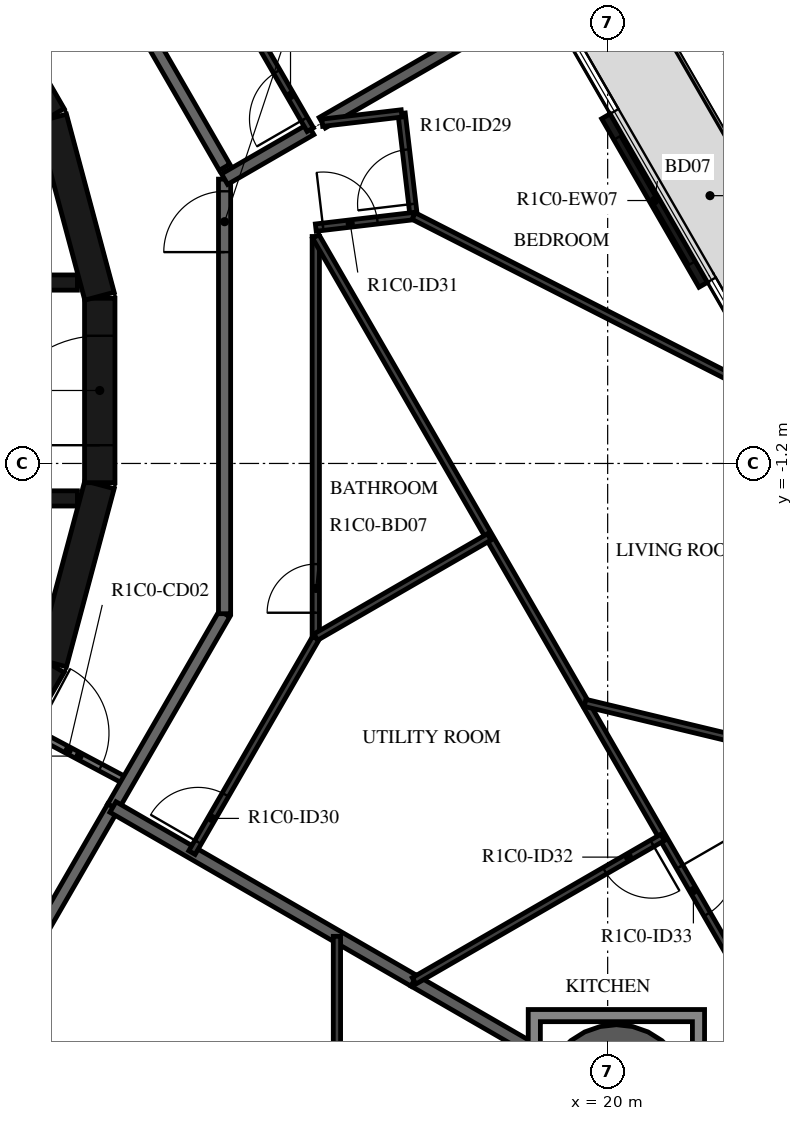
"""IFC4 building model, lengths in metres.
Left out: names, types, materials, properties, quantities, classifications, styles, units other than length and angle.
Written with IfcOpenShell. Run it as: python <this file> out.ifc"""

import sys

from ifc_helpers import new_model, si_unit, direction, frame, frame_2d, origin, origin_2d, place, context, subcontext, project, spatial, polyline, rectangle, hollow_circle, outline, extrude, element, fill, save


model = new_model("IFC4")
c1 = context("Model", 3, precision=1e-05, world=origin(), true_north=direction((0.0, 1.0)))
c2 = subcontext(c1, "Body", "Model", "MODEL_VIEW")
j1 = project(units=[si_unit("LENGTHUNIT", "METRE"), si_unit("PLANEANGLEUNIT", "RADIAN")], contexts=[c1])
p1 = place(None, origin())
s1 = spatial("IfcSite", under=j1, at=p1, CompositionType="ELEMENT")
p2 = place(p1, origin())
s2 = spatial("IfcBuilding", under=s1, at=p2, CompositionType="ELEMENT")
p3 = place(p2, frame((0.0, 0.0, 66.4)))
s3 = spatial("IfcBuildingStorey", under=s2, at=p3, CompositionType="ELEMENT", Elevation=66.4)
p4 = place(p3, frame((20.144, -11.63, -0.38), z_axis=(0.0, 0.0, 1.0), x_axis=(1.0, 0.0, 0.0)))
e1 = element("IfcColumn", 1, at=p4, inside=s3, PredefinedType="COLUMN", context=c2, shape_type="SweptSolid", body=[
    extrude(hollow_circle(Radius=1.2, WallThickness=0.06, at=origin_2d()), origin(), (0.0, 0.0, 1.0), 2.616),
])
p5 = place(p3, frame((21.571, 1.738, 0.0), z_axis=(0.0, 0.0, 1.0), x_axis=(-0.500028443584, 0.866008981251, 0.0)))
e2 = element("IfcWall", 2, at=p5, inside=s3, PredefinedType="STANDARD", context=c2, shape_type="SweptSolid", body=[
    extrude(rectangle(XDim=3.2, YDim=0.16, at=frame_2d((1.6, 0.0))), origin(), (0.0, 0.0, 1.0), 3.05),
])
p6 = place(p5, frame((0.4, 0.0, 0.0)))
e3 = element("IfcOpeningElement", 3, at=p6, cuts=e2, PredefinedType="OPENING", context=c2, shape_type="SweptSolid", body=[
    extrude(rectangle(XDim=2.4, YDim=2.4, at=frame_2d((1.2, 1.2))), frame((0.0, 0.09, 0.0), z_axis=(0.0, -1.0, 0.0), x_axis=(1.0, 0.0, 0.0)), (0.0, 0.0, 1.0), 0.18),
])
for number, where, z_axis, x_axis in (
    (4, (9.329, -7.137, 0.0), (0.0, 0.0, 1.0), (0.5, 0.866, 0.0)),
    (5, (10.858, -4.479, 0.0), (0.0, 0.0, 1.0), (0.259, 0.966, 0.0)),
):
    element("IfcWall", number, at=place(p3, frame(where, z_axis=z_axis, x_axis=x_axis)), inside=s3, PredefinedType="SHEAR", context=c2, shape_type="SweptSolid", body=[
        extrude(rectangle(XDim=3.033, YDim=0.5, at=frame_2d((1.516, 0.0))), origin(), (0.0, 0.0, 1.0), 3.05),
    ])
p7 = place(p3, frame((11.647, -1.516, 0.0), z_axis=(0.0, 0.0, 1.0), x_axis=(0.0, 1.0, 0.0)))
e6 = element("IfcWall", 6, at=p7, inside=s3, PredefinedType="SHEAR", context=c2, shape_type="SweptSolid", body=[
    extrude(rectangle(XDim=3.033, YDim=0.5, at=frame_2d((1.516, 0.0))), origin(), (0.0, 0.0, 1.0), 3.05),
])
p8 = place(p7, frame((0.616, 0.0, 0.0)))
e7 = element("IfcOpeningElement", 7, at=p8, cuts=e6, PredefinedType="OPENING", context=c2, shape_type="SweptSolid", body=[
    extrude(rectangle(XDim=1.8, YDim=2.1, at=frame_2d((0.9, 1.05))), frame((0.0, 0.26, 0.0), z_axis=(0.0, -1.0, 0.0), x_axis=(1.0, 0.0, 0.0)), (0.0, 0.0, 1.0), 0.52),
])
for number, where, z_axis, x_axis in (
    (8, (11.643, 1.55, 0.0), (0.0, 0.0, 1.0), (-0.259, 0.966, 0.0)),
    (9, (10.845, 4.51, 0.0), (0.0, 0.0, 1.0), (-0.5, 0.866, 0.0)),
):
    element("IfcWall", number, at=place(p3, frame(where, z_axis=z_axis, x_axis=x_axis)), inside=s3, PredefinedType="SHEAR", context=c2, shape_type="SweptSolid", body=[
        extrude(rectangle(XDim=3.033, YDim=0.5, at=frame_2d((1.516, 0.0))), origin(), (0.0, 0.0, 1.0), 3.05),
    ])
p9 = place(p3, frame((3.35, 1.775, 0.0), z_axis=(0.0, 0.0, 1.0), x_axis=(1.0, 0.0, 0.0)))
e10 = element("IfcWall", 10, at=p9, inside=s3, PredefinedType="SHEAR", context=c2, shape_type="SweptSolid", body=[
    extrude(rectangle(XDim=7.93, YDim=0.25, at=frame_2d((3.965, 0.0))), origin(), (0.0, 0.0, 1.0), 3.05),
])
p10 = place(p9, frame((0.35, 0.0, 0.0)))
e11 = element("IfcOpeningElement", 11, at=p10, cuts=e10, PredefinedType="OPENING", context=c2, shape_type="SweptSolid", body=[
    extrude(rectangle(XDim=1.2, YDim=2.4, at=frame_2d((0.6, 1.2))), frame((0.0, 0.135, 0.0), z_axis=(0.0, -1.0, 0.0), x_axis=(1.0, 0.0, 0.0)), (0.0, 0.0, 1.0), 0.27),
])
p11 = place(p9, frame((2.5, 0.0, 0.0)))
e12 = element("IfcOpeningElement", 12, at=p11, cuts=e10, PredefinedType="OPENING", context=c2, shape_type="SweptSolid", body=[
    extrude(rectangle(XDim=1.2, YDim=2.4, at=frame_2d((0.6, 1.2))), frame((0.0, 0.135, 0.0), z_axis=(0.0, -1.0, 0.0), x_axis=(1.0, 0.0, 0.0)), (0.0, 0.0, 1.0), 0.27),
])
p12 = place(p9, frame((4.8, 0.0, 0.0)))
e13 = element("IfcOpeningElement", 13, at=p12, cuts=e10, PredefinedType="OPENING", context=c2, shape_type="SweptSolid", body=[
    extrude(rectangle(XDim=0.9, YDim=2.1, at=frame_2d((0.45, 1.05))), frame((0.0, 0.135, 0.0), z_axis=(0.0, -1.0, 0.0), x_axis=(1.0, 0.0, 0.0)), (0.0, 0.0, 1.0), 0.27),
])
p13 = place(p3, frame((3.35, -1.775, 0.0), z_axis=(0.0, 0.0, 1.0), x_axis=(1.0, 0.0, 0.0)))
e14 = element("IfcWall", 14, at=p13, inside=s3, PredefinedType="SHEAR", context=c2, shape_type="SweptSolid", body=[
    extrude(rectangle(XDim=7.93, YDim=0.25, at=frame_2d((3.965, 0.0))), origin(), (0.0, 0.0, 1.0), 3.05),
])
p14 = place(p13, frame((0.4, 0.0, 0.0)))
e15 = element("IfcOpeningElement", 15, at=p14, cuts=e14, PredefinedType="OPENING", context=c2, shape_type="SweptSolid", body=[
    extrude(rectangle(XDim=1.1, YDim=2.4, at=frame_2d((0.55, 1.2))), frame((0.0, 0.135, 0.0), z_axis=(0.0, -1.0, 0.0), x_axis=(1.0, 0.0, 0.0)), (0.0, 0.0, 1.0), 0.27),
])
p15 = place(p13, frame((2.55, 0.0, 0.0)))
e16 = element("IfcOpeningElement", 16, at=p15, cuts=e14, PredefinedType="OPENING", context=c2, shape_type="SweptSolid", body=[
    extrude(rectangle(XDim=1.1, YDim=2.4, at=frame_2d((0.55, 1.2))), frame((0.0, 0.135, 0.0), z_axis=(0.0, -1.0, 0.0), x_axis=(1.0, 0.0, 0.0)), (0.0, 0.0, 1.0), 0.27),
])
p16 = place(p13, frame((4.7, 0.0, 0.0)))
e17 = element("IfcOpeningElement", 17, at=p16, cuts=e14, PredefinedType="OPENING", context=c2, shape_type="SweptSolid", body=[
    extrude(rectangle(XDim=1.1, YDim=2.4, at=frame_2d((0.55, 1.2))), frame((0.0, 0.135, 0.0), z_axis=(0.0, -1.0, 0.0), x_axis=(1.0, 0.0, 0.0)), (0.0, 0.0, 1.0), 0.27),
])
p17 = place(p3, frame((10.511, -5.589, 0.0), z_axis=(0.0, 0.0, 1.0), x_axis=(0.88294043061, -0.469485032769, 0.0)))
e18 = element("IfcWall", 18, at=p17, inside=s3, PredefinedType="PARTITIONING", context=c2, shape_type="SweptSolid", body=[
    extrude(rectangle(XDim=1.804, YDim=0.12, at=frame_2d((0.902, 0.0))), origin(), (0.0, 0.0, 1.0), 3.05),
])
p18 = place(p17, frame((0.1, 0.0, 0.0)))
e19 = element("IfcOpeningElement", 19, at=p18, cuts=e18, PredefinedType="OPENING", context=c2, shape_type="SweptSolid", body=[
    extrude(rectangle(XDim=1.2, YDim=2.1, at=frame_2d((0.6, 1.05))), frame((0.0, 0.07, 0.0), z_axis=(0.0, -1.0, 0.0), x_axis=(1.0, 0.0, 0.0)), (0.0, 0.0, 1.0), 0.14),
])
p19 = place(p3, frame((13.7, 3.671, 0.0), z_axis=(0.0, 0.0, 1.0), x_axis=(-0.500001669485, 0.866024439905, 0.0)))
e20 = element("IfcWall", 20, at=p19, inside=s3, PredefinedType="STANDARD", context=c2, shape_type="SweptSolid", body=[
    extrude(rectangle(XDim=7.342, YDim=0.2, at=frame_2d((3.671, 0.0))), origin(), (0.0, 0.0, 1.0), 3.05),
])
p20 = place(p19, frame((6.142, 0.0, 0.0)))
e21 = element("IfcOpeningElement", 21, at=p20, cuts=e20, PredefinedType="OPENING", context=c2, shape_type="SweptSolid", body=[
    extrude(rectangle(XDim=1.0, YDim=2.1, at=frame_2d((0.5, 1.05))), frame((0.0, 0.11, 0.0), z_axis=(0.0, -1.0, 0.0), x_axis=(1.0, 0.0, 0.0)), (0.0, 0.0, 1.0), 0.22),
])
p21 = place(p3, frame((11.865, -6.85, 0.0), z_axis=(0.0, 0.0, 1.0), x_axis=(0.499987270552, 0.86603275301, 0.0)))
e22 = element("IfcWall", 22, at=p21, inside=s3, PredefinedType="STANDARD", context=c2, shape_type="SweptSolid", body=[
    extrude(rectangle(XDim=3.671, YDim=0.2, at=frame_2d((1.835, 0.0))), origin(), (0.0, 0.0, 1.0), 3.05),
])
p22 = place(p3, frame((13.7, -3.671, 0.0), z_axis=(0.0, 0.0, 1.0), x_axis=(0.0, 1.0, 0.0)))
e23 = element("IfcWall", 23, at=p22, inside=s3, PredefinedType="STANDARD", context=c2, shape_type="SweptSolid", body=[
    extrude(rectangle(XDim=7.146, YDim=0.2, at=frame_2d((3.573, 0.0))), origin(), (0.0, 0.0, 1.0), 3.05),
])
p23 = place(p22, frame((5.947, 0.0, 0.0)))
e24 = element("IfcOpeningElement", 24, at=p23, cuts=e23, PredefinedType="OPENING", context=c2, shape_type="SweptSolid", body=[
    extrude(rectangle(XDim=1.0, YDim=2.1, at=frame_2d((0.5, 1.05))), frame((0.0, 0.11, 0.0), z_axis=(0.0, -1.0, 0.0), x_axis=(1.0, 0.0, 0.0)), (0.0, 0.0, 1.0), 0.22),
])
p24 = place(p3, frame((10.029, -10.029, 0.0), z_axis=(0.0, 0.0, 1.0), x_axis=(0.50001606911, 0.866016126081, 0.0)))
e25 = element("IfcWall", 25, at=p24, inside=s3, PredefinedType="STANDARD", context=c2, shape_type="SweptSolid", body=[
    extrude(rectangle(XDim=3.671, YDim=0.2, at=frame_2d((1.835, 0.0))), origin(), (0.0, 0.0, 1.0), 3.05),
])
p25 = place(p3, frame((13.7, 3.476, 0.0), z_axis=(0.0, 0.0, 1.0), x_axis=(0.866014281772, 0.500019263395, 0.0)))
e26 = element("IfcWall", 26, at=p25, inside=s3, PredefinedType="STANDARD", context=c2, shape_type="SweptSolid", body=[
    extrude(rectangle(XDim=1.638, YDim=0.2, at=frame_2d((0.819, 0.0))), origin(), (0.0, 0.0, 1.0), 3.05),
])
p26 = place(p3, frame((15.306, 4.403, 0.0), z_axis=(0.0, 0.0, 1.0), x_axis=(0.866013143551, 0.500021234745, 0.0)))
e27 = element("IfcWall", 27, at=p26, inside=s3, PredefinedType="STANDARD", context=c2, shape_type="SweptSolid", body=[
    extrude(rectangle(XDim=4.173, YDim=0.2, at=frame_2d((2.086, 0.0))), origin(), (0.0, 0.0, 1.0), 3.05),
])
p27 = place(p3, frame((16.817, -9.709, 0.0), z_axis=(0.0, 0.0, 1.0), x_axis=(-0.86604338933, 0.499968846828, 0.0)))
e28 = element("IfcWall", 28, at=p27, inside=s3, PredefinedType="STANDARD", context=c2, shape_type="SweptSolid", body=[
    extrude(rectangle(XDim=5.718, YDim=0.2, at=frame_2d((2.859, 0.0))), origin(), (0.0, 0.0, 1.0), 3.05),
])
p28 = place(p3, frame((18.694, -10.793, 0.0), z_axis=(0.0, 0.0, 1.0), x_axis=(-0.866009251978, 0.500027974705, 0.0)))
e29 = element("IfcWall", 29, at=p28, inside=s3, PredefinedType="STANDARD", context=c2, shape_type="SweptSolid", body=[
    extrude(rectangle(XDim=2.167, YDim=0.2, at=frame_2d((1.084, 0.0))), origin(), (0.0, 0.0, 1.0), 3.05),
])
p29 = place(p3, frame((15.11, 4.289, 0.0), z_axis=(0.0, 0.0, 1.0), x_axis=(-0.500033654285, 0.866005972602, 0.0)))
e30 = element("IfcWall", 30, at=p29, inside=s3, PredefinedType="PARTITIONING", context=c2, shape_type="SweptSolid", body=[
    extrude(rectangle(XDim=5.003, YDim=0.12, at=frame_2d((2.501, 0.0))), origin(), (0.0, 0.0, 1.0), 3.05),
])
p30 = place(p29, frame((0.2, 0.0, 0.0)))
e31 = element("IfcOpeningElement", 31, at=p30, cuts=e30, PredefinedType="OPENING", context=c2, shape_type="SweptSolid", body=[
    extrude(rectangle(XDim=0.9, YDim=2.1, at=frame_2d((0.45, 1.05))), frame((0.0, 0.07, 0.0), z_axis=(0.0, -1.0, 0.0), x_axis=(1.0, 0.0, 0.0)), (0.0, 0.0, 1.0), 0.14),
])
p31 = place(p3, frame((15.548, -15.23, 0.0), z_axis=(0.0, 0.0, 1.0), x_axis=(0.0, 1.0, 0.0)))
e32 = element("IfcWall", 32, at=p31, inside=s3, PredefinedType="PARTITIONING", context=c2, shape_type="SweptSolid", body=[
    extrude(rectangle(XDim=6.253, YDim=0.12, at=frame_2d((3.127, 0.0))), origin(), (0.0, 0.0, 1.0), 3.05),
])
p32 = place(p31, frame((0.2, 0.0, 0.0)))
e33 = element("IfcOpeningElement", 33, at=p32, cuts=e32, PredefinedType="OPENING", context=c2, shape_type="SweptSolid", body=[
    extrude(rectangle(XDim=0.9, YDim=2.1, at=frame_2d((0.45, 1.05))), frame((0.0, 0.07, 0.0), z_axis=(0.0, -1.0, 0.0), x_axis=(1.0, 0.0, 0.0)), (0.0, 0.0, 1.0), 0.14),
])
p33 = place(p3, frame((16.81, 2.868, 0.0), z_axis=(0.0, 0.0, 1.0), x_axis=(-0.117049566217, 0.993126074096, 0.0)))
e34 = element("IfcWall", 34, at=p33, inside=s3, PredefinedType="PARTITIONING", context=c2, shape_type="SweptSolid", body=[
    extrude(rectangle(XDim=1.7, YDim=0.12, at=frame_2d((0.85, 0.0))), origin(), (0.0, 0.0, 1.0), 3.05),
])
p34 = place(p33, frame((0.2, 0.0, 0.0)))
e35 = element("IfcOpeningElement", 35, at=p34, cuts=e34, PredefinedType="OPENING", context=c2, shape_type="SweptSolid", body=[
    extrude(rectangle(XDim=0.9, YDim=2.1, at=frame_2d((0.45, 1.05))), frame((0.0, 0.07, 0.0), z_axis=(0.0, -1.0, 0.0), x_axis=(1.0, 0.0, 0.0)), (0.0, 0.0, 1.0), 0.14),
])
p35 = place(p3, frame((16.611, 4.556, 0.0), z_axis=(0.0, 0.0, 1.0), x_axis=(-0.993151872114, -0.116830470836, 0.0)))
e36 = element("IfcWall", 36, at=p35, inside=s3, PredefinedType="PARTITIONING", context=c2, shape_type="SweptSolid", body=[
    extrude(rectangle(XDim=1.314, YDim=0.12, at=frame_2d((0.657, 0.0))), origin(), (0.0, 0.0, 1.0), 3.05),
])
p36 = place(p3, frame((13.164, -7.6, 0.0), z_axis=(0.0, 0.0, 1.0), x_axis=(0.499974973053, 0.866039852617, 0.0)))
e37 = element("IfcWall", 37, at=p36, inside=s3, PredefinedType="PARTITIONING", context=c2, shape_type="SweptSolid", body=[
    extrude(rectangle(XDim=4.073, YDim=0.12, at=frame_2d((2.037, 0.0))), origin(), (0.0, 0.0, 1.0), 3.05),
])
p37 = place(p36, frame((0.2, 0.0, 0.0)))
e38 = element("IfcOpeningElement", 38, at=p37, cuts=e37, PredefinedType="OPENING", context=c2, shape_type="SweptSolid", body=[
    extrude(rectangle(XDim=0.9, YDim=2.1, at=frame_2d((0.45, 1.05))), frame((0.0, 0.07, 0.0), z_axis=(0.0, -1.0, 0.0), x_axis=(1.0, 0.0, 0.0)), (0.0, 0.0, 1.0), 0.14),
])
p38 = place(p3, frame((15.2, 2.679, 0.0), z_axis=(0.0, 0.0, 1.0), x_axis=(0.993150604323, 0.116841247567, 0.0)))
e39 = element("IfcWall", 39, at=p38, inside=s3, PredefinedType="PARTITIONING", context=c2, shape_type="SweptSolid", body=[
    extrude(rectangle(XDim=1.621, YDim=0.12, at=frame_2d((0.811, 0.0))), origin(), (0.0, 0.0, 1.0), 3.05),
])
p39 = place(p38, frame((0.12, 0.0, 0.0)))
e40 = element("IfcOpeningElement", 40, at=p39, cuts=e39, PredefinedType="OPENING", context=c2, shape_type="SweptSolid", body=[
    extrude(rectangle(XDim=0.9, YDim=2.1, at=frame_2d((0.45, 1.05))), frame((0.0, 0.07, 0.0), z_axis=(0.0, -1.0, 0.0), x_axis=(1.0, 0.0, 0.0)), (0.0, 0.0, 1.0), 0.14),
])
p40 = place(p3, frame((15.2, -4.055, 0.0), z_axis=(0.0, 0.0, 1.0), x_axis=(0.0, 1.0, 0.0)))
e41 = element("IfcWall", 41, at=p40, inside=s3, PredefinedType="PARTITIONING", context=c2, shape_type="SweptSolid", body=[
    extrude(rectangle(XDim=6.588, YDim=0.12, at=frame_2d((3.294, 0.0))), origin(), (0.0, 0.0, 1.0), 3.05),
])
p41 = place(p40, frame((0.4, 0.0, 0.0)))
e42 = element("IfcOpeningElement", 42, at=p41, cuts=e41, PredefinedType="OPENING", context=c2, shape_type="SweptSolid", body=[
    extrude(rectangle(XDim=0.8, YDim=2.1, at=frame_2d((0.4, 1.05))), frame((0.0, 0.07, 0.0), z_axis=(0.0, -1.0, 0.0), x_axis=(1.0, 0.0, 0.0)), (0.0, 0.0, 1.0), 0.14),
])
p42 = place(p3, frame((16.81, 2.868, 0.0), z_axis=(0.0, 0.0, 1.0), x_axis=(0.891097252128, -0.453812392128, 0.0)))
e43 = element("IfcWall", 43, at=p42, inside=s3, PredefinedType="PARTITIONING", context=c2, shape_type="SweptSolid", body=[
    extrude(rectangle(XDim=6.677, YDim=0.12, at=frame_2d((3.338, 0.0))), origin(), (0.0, 0.0, 1.0), 3.05),
])
p43 = place(p3, frame((15.2, 2.533, 0.0), z_axis=(0.0, 0.0, 1.0), x_axis=(0.500001127339, -0.866024752914, 0.0)))
e44 = element("IfcWall", 44, at=p43, inside=s3, PredefinedType="PARTITIONING", context=c2, shape_type="SweptSolid", body=[
    extrude(rectangle(XDim=14.434, YDim=0.12, at=frame_2d((7.217, 0.0))), origin(), (0.0, 0.0, 1.0), 3.05),
])
p44 = place(p43, frame((11.97, 0.0, 0.0)))
e45 = element("IfcOpeningElement", 45, at=p44, cuts=e44, PredefinedType="OPENING", context=c2, shape_type="SweptSolid", body=[
    extrude(rectangle(XDim=0.9, YDim=2.1, at=frame_2d((0.45, 1.05))), frame((0.0, 0.07, 0.0), z_axis=(0.0, -1.0, 0.0), x_axis=(1.0, 0.0, 0.0)), (0.0, 0.0, 1.0), 0.14),
])
p45 = place(p3, frame((20.905, -7.349, 0.0), z_axis=(0.0, 0.0, 1.0), x_axis=(-0.866032292145, -0.49998806882, 0.0)))
e46 = element("IfcWall", 46, at=p45, inside=s3, PredefinedType="PARTITIONING", context=c2, shape_type="SweptSolid", body=[
    extrude(rectangle(XDim=4.721, YDim=0.12, at=frame_2d((2.36, 0.0))), origin(), (0.0, 0.0, 1.0), 3.05),
])
p46 = place(p45, frame((0.2, 0.0, 0.0)))
e47 = element("IfcOpeningElement", 47, at=p46, cuts=e46, PredefinedType="OPENING", context=c2, shape_type="SweptSolid", body=[
    extrude(rectangle(XDim=0.9, YDim=2.1, at=frame_2d((0.45, 1.05))), frame((0.0, 0.07, 0.0), z_axis=(0.0, -1.0, 0.0), x_axis=(1.0, 0.0, 0.0)), (0.0, 0.0, 1.0), 0.14),
])
p47 = place(p3, frame((18.052, -2.408, 0.0), z_axis=(0.0, 0.0, 1.0), x_axis=(-0.866017718408, -0.500013311227, 0.0)))
e48 = element("IfcWall", 48, at=p47, inside=s3, PredefinedType="PARTITIONING", context=c2, shape_type="SweptSolid", body=[
    extrude(rectangle(XDim=3.294, YDim=0.12, at=frame_2d((1.647, 0.0))), origin(), (0.0, 0.0, 1.0), 3.05),
])
p48 = place(p3, frame((26.6, -6.813, 0.0), z_axis=(0.0, 0.0, 1.0), x_axis=(-0.972307508101, 0.23370517686, 0.0)))
e49 = element("IfcWall", 49, at=p48, inside=s3, PredefinedType="PARTITIONING", context=c2, shape_type="SweptSolid", body=[
    extrude(rectangle(XDim=7.17, YDim=0.12, at=frame_2d((3.585, 0.0))), origin(), (0.0, 0.0, 1.0), 3.05),
])
p49 = place(p3, origin())
e50 = element("IfcWall", 50, at=p49, inside=s3, PredefinedType="STANDARD", context=c2, shape_type="SweptSolid", body=[
    extrude(outline(polyline([(21.594, -10.18), (21.594, -13.08), (18.694, -13.08), (18.694, -10.18), (21.594, -10.18)]), holes=[polyline([(18.894, -12.88), (21.394, -12.88), (21.394, -10.38), (18.894, -10.38), (18.894, -12.88)])]), origin(), (0.0, 0.0, 1.0), 3.05),
])
p50 = place(p6, origin())
e51 = element("IfcDoor", 51, at=p50, inside=s3, OperationType="DOUBLE_DOOR_SLIDING", PredefinedType="DOOR", context=c2, shape_type="SweptSolid", body=[
    extrude(rectangle(XDim=2.4, YDim=2.4, at=frame_2d((1.2, 1.2))), frame((0.0, 0.025, 0.0), z_axis=(0.0, -1.0, 0.0), x_axis=(1.0, 0.0, 0.0)), (0.0, 0.0, 1.0), 0.05),
])
fill(e3, e51)
p51 = place(p8, origin())
e52 = element("IfcDoor", 52, at=p51, inside=s3, OperationType="DOUBLE_DOOR_SINGLE_SWING", PredefinedType="DOOR", context=c2, shape_type="SweptSolid", body=[
    extrude(rectangle(XDim=1.8, YDim=2.1, at=frame_2d((0.9, 1.05))), frame((0.0, 0.025, 0.0), z_axis=(0.0, -1.0, 0.0), x_axis=(1.0, 0.0, 0.0)), (0.0, 0.0, 1.0), 0.05),
])
fill(e7, e52)
p52 = place(p30, origin())
e53 = element("IfcDoor", 53, at=p52, inside=s3, OperationType="SINGLE_SWING_LEFT", PredefinedType="DOOR", context=c2, shape_type="SweptSolid", body=[
    extrude(rectangle(XDim=0.9, YDim=2.1, at=frame_2d((0.45, 1.05))), frame((0.0, 0.025, 0.0), z_axis=(0.0, -1.0, 0.0), x_axis=(1.0, 0.0, 0.0)), (0.0, 0.0, 1.0), 0.05),
])
fill(e31, e53)
p53 = place(p23, origin())
e54 = element("IfcDoor", 54, at=p53, inside=s3, OperationType="SINGLE_SWING_LEFT", PredefinedType="DOOR", context=c2, shape_type="SweptSolid", body=[
    extrude(rectangle(XDim=1.0, YDim=2.1, at=frame_2d((0.5, 1.05))), frame((0.0, 0.025, 0.0), z_axis=(0.0, -1.0, 0.0), x_axis=(1.0, 0.0, 0.0)), (0.0, 0.0, 1.0), 0.05),
])
fill(e24, e54)
p54 = place(p34, origin())
e55 = element("IfcDoor", 55, at=p54, inside=s3, OperationType="SINGLE_SWING_LEFT", PredefinedType="DOOR", context=c2, shape_type="SweptSolid", body=[
    extrude(rectangle(XDim=0.9, YDim=2.1, at=frame_2d((0.45, 1.05))), frame((0.0, 0.025, 0.0), z_axis=(0.0, -1.0, 0.0), x_axis=(1.0, 0.0, 0.0)), (0.0, 0.0, 1.0), 0.05),
])
fill(e35, e55)
p55 = place(p37, origin())
e56 = element("IfcDoor", 56, at=p55, inside=s3, OperationType="SINGLE_SWING_LEFT", PredefinedType="DOOR", context=c2, shape_type="SweptSolid", body=[
    extrude(rectangle(XDim=0.9, YDim=2.1, at=frame_2d((0.45, 1.05))), frame((0.0, 0.025, 0.0), z_axis=(0.0, -1.0, 0.0), x_axis=(1.0, 0.0, 0.0)), (0.0, 0.0, 1.0), 0.05),
])
fill(e38, e56)
p56 = place(p39, origin())
e57 = element("IfcDoor", 57, at=p56, inside=s3, OperationType="SINGLE_SWING_RIGHT", PredefinedType="DOOR", context=c2, shape_type="SweptSolid", body=[
    extrude(rectangle(XDim=0.9, YDim=2.1, at=frame_2d((0.45, 1.05))), frame((0.0, 0.025, 0.0), z_axis=(0.0, -1.0, 0.0), x_axis=(1.0, 0.0, 0.0)), (0.0, 0.0, 1.0), 0.05),
])
fill(e40, e57)
p57 = place(p41, origin())
e58 = element("IfcDoor", 58, at=p57, inside=s3, OperationType="SINGLE_SWING_LEFT", PredefinedType="DOOR", context=c2, shape_type="SweptSolid", body=[
    extrude(rectangle(XDim=0.8, YDim=2.1, at=frame_2d((0.4, 1.05))), frame((0.0, 0.025, 0.0), z_axis=(0.0, -1.0, 0.0), x_axis=(1.0, 0.0, 0.0)), (0.0, 0.0, 1.0), 0.05),
])
fill(e42, e58)
p58 = place(p46, origin())
e59 = element("IfcDoor", 59, at=p58, inside=s3, OperationType="SINGLE_SWING_LEFT", PredefinedType="DOOR", context=c2, shape_type="SweptSolid", body=[
    extrude(rectangle(XDim=0.9, YDim=2.1, at=frame_2d((0.45, 1.05))), frame((0.0, 0.025, 0.0), z_axis=(0.0, -1.0, 0.0), x_axis=(1.0, 0.0, 0.0)), (0.0, 0.0, 1.0), 0.05),
])
fill(e47, e59)
p59 = place(p44, origin())
e60 = element("IfcDoor", 60, at=p59, inside=s3, OperationType="SINGLE_SWING_LEFT", PredefinedType="DOOR", context=c2, shape_type="SweptSolid", body=[
    extrude(rectangle(XDim=0.9, YDim=2.1, at=frame_2d((0.45, 1.05))), frame((0.0, 0.025, 0.0), z_axis=(0.0, -1.0, 0.0), x_axis=(1.0, 0.0, 0.0)), (0.0, 0.0, 1.0), 0.05),
])
fill(e45, e60)
p60 = place(p18, origin())
e61 = element("IfcDoor", 61, at=p60, inside=s3, OperationType="DOUBLE_DOOR_SINGLE_SWING", PredefinedType="DOOR", context=c2, shape_type="SweptSolid", body=[
    extrude(rectangle(XDim=1.2, YDim=2.1, at=frame_2d((0.6, 1.05))), frame((0.0, 0.025, 0.0), z_axis=(0.0, -1.0, 0.0), x_axis=(1.0, 0.0, 0.0)), (0.0, 0.0, 1.0), 0.05),
])
fill(e19, e61)
save(model, sys.argv[1])
